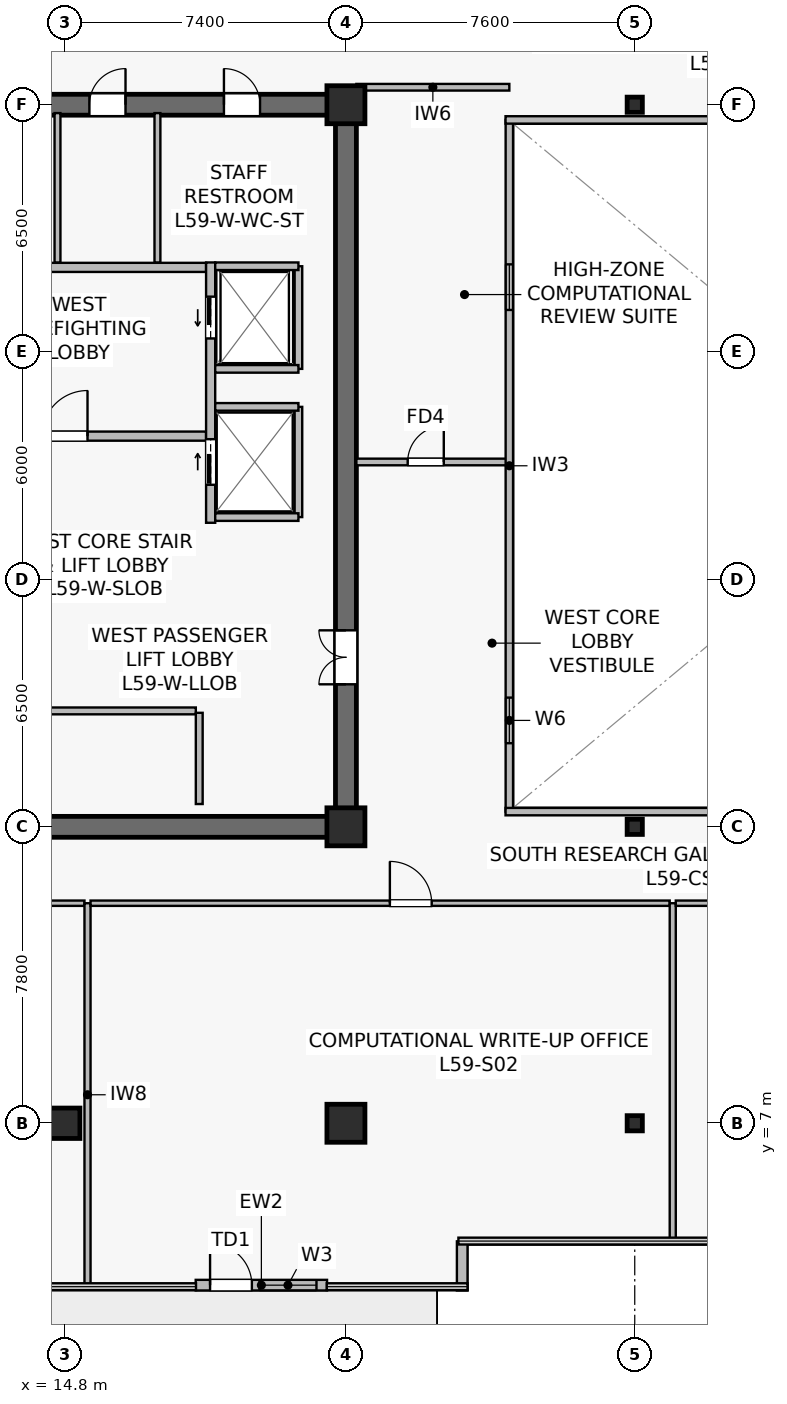
"""IFC4 building model, lengths in metres.
Left out: names, types, materials, properties, quantities, classifications, styles, units other than length and angle.
Written with IfcOpenShell. Run it as: python <this file> out.ifc"""

import sys

from ifc_helpers import new_model, si_unit, direction, frame, frame_2d, origin, origin_2d, place, context, subcontext, project, spatial, rectangle, hollow_rectangle, extrude, source, transform, mapped, element, fill, save


model = new_model("IFC4")
c1 = context("Model", 3, precision=1e-05, world=origin(), true_north=direction((0.0, 1.0)))
c2 = subcontext(c1, "Body", "Model", "MODEL_VIEW")
j1 = project(units=[si_unit("LENGTHUNIT", "METRE"), si_unit("PLANEANGLEUNIT", "RADIAN")], contexts=[c1])
p1 = place(None, origin())
s1 = spatial("IfcSite", under=j1, at=p1, CompositionType="ELEMENT")
p2 = place(p1, origin())
s2 = spatial("IfcBuilding", under=s1, at=p2, CompositionType="ELEMENT")
p3 = place(p2, frame((0.0, 0.0, 246.5)))
s3 = spatial("IfcBuildingStorey", under=s2, at=p3, CompositionType="ELEMENT", Elevation=246.5)
p4 = place(p3, frame((7.125, 14.8, 0.0), z_axis=(0.0, 0.0, 1.0), x_axis=(1.0, 0.0, 0.0)))
e1 = element("IfcWall", 1, at=p4, inside=s3, PredefinedType="SHEAR", context=c2, shape_type="SweptSolid", body=[
    extrude(rectangle(XDim=15.35, YDim=0.55, at=frame_2d((7.675, 0.0))), origin(), (0.0, 0.0, 1.0), 3.8),
])
p5 = place(p3, frame((7.125, 33.8, 0.0), z_axis=(0.0, 0.0, 1.0), x_axis=(1.0, 0.0, 0.0)))
e2 = element("IfcWall", 2, at=p5, inside=s3, PredefinedType="SHEAR", context=c2, shape_type="SweptSolid", body=[
    extrude(rectangle(XDim=15.35, YDim=0.55, at=frame_2d((7.675, 0.0))), origin(), (0.0, 0.0, 1.0), 3.8),
])
p6 = place(p5, frame((8.325, 0.0, 0.0)))
e3 = element("IfcOpeningElement", 3, at=p6, cuts=e2, PredefinedType="OPENING", context=c2, shape_type="SweptSolid", body=[
    extrude(rectangle(XDim=0.95, YDim=2.15, at=frame_2d((0.475, 1.075))), frame((0.0, 0.285, 0.0), z_axis=(0.0, -1.0, 0.0), x_axis=(1.0, 0.0, 0.0)), (0.0, 0.0, 1.0), 0.57),
])
p7 = place(p5, frame((11.865, 0.0, 0.0)))
e4 = element("IfcOpeningElement", 4, at=p7, cuts=e2, PredefinedType="OPENING", context=c2, shape_type="SweptSolid", body=[
    extrude(rectangle(XDim=0.95, YDim=2.15, at=frame_2d((0.475, 1.075))), frame((0.0, 0.285, 0.0), z_axis=(0.0, -1.0, 0.0), x_axis=(1.0, 0.0, 0.0)), (0.0, 0.0, 1.0), 0.57),
])
p8 = place(p3, frame((22.2, 15.075, 0.0), z_axis=(0.0, 0.0, 1.0), x_axis=(0.0, 1.0, 0.0)))
e5 = element("IfcWall", 5, at=p8, inside=s3, PredefinedType="SHEAR", context=c2, shape_type="SweptSolid", body=[
    extrude(rectangle(XDim=18.45, YDim=0.55, at=frame_2d((9.225, 0.0))), origin(), (0.0, 0.0, 1.0), 3.8),
])
p9 = place(p8, frame((3.475, 0.0, 0.0)))
e6 = element("IfcOpeningElement", 6, at=p9, cuts=e5, PredefinedType="OPENING", context=c2, shape_type="SweptSolid", body=[
    extrude(rectangle(XDim=1.42, YDim=2.2, at=frame_2d((0.71, 1.1))), frame((0.0, 0.285, 0.0), z_axis=(0.0, -1.0, 0.0), x_axis=(1.0, 0.0, 0.0)), (0.0, 0.0, 1.0), 0.57),
])
m1 = source(origin(), c2, "Body", "SweptSolid", [
    extrude(rectangle(XDim=0.8, YDim=0.8, at=origin_2d()), origin(), (0.0, 0.0, 1.0), 4.1),
])
p10 = place(p3, frame((14.8, 7.0, 0.0), z_axis=(0.0, 0.0, 1.0), x_axis=(1.0, 0.0, 0.0)))
e7 = element("IfcColumn", 7, at=p10, inside=s3, PredefinedType="COLUMN", context=c2, shape_type="MappedRepresentation", body=[
    mapped(m1, transform((0.0, 0.0, 0.0), scale=1.0)),
])
m2 = source(origin(), c2, "Body", "SweptSolid", [
    extrude(rectangle(XDim=1.0, YDim=1.0, at=origin_2d()), origin(), (0.0, 0.0, 1.0), 4.1),
])
for number, where, z_axis, x_axis in (
    (8, (22.2, 7.0, 0.0), (0.0, 0.0, 1.0), (1.0, 0.0, 0.0)),
    (9, (22.2, 14.8, 0.0), (0.0, 0.0, 1.0), (1.0, 0.0, 0.0)),
    (10, (22.2, 33.8, 0.0), (0.0, 0.0, 1.0), (1.0, 0.0, 0.0)),
):
    element("IfcColumn", number, at=place(p3, frame(where, z_axis=z_axis, x_axis=x_axis)), inside=s3, PredefinedType="COLUMN", context=c2, shape_type="MappedRepresentation", body=[
        mapped(m2, transform((0.0, 0.0, 0.0), scale=1.0)),
    ])
m3 = source(origin(), c2, "Body", "SweptSolid", [
    extrude(hollow_rectangle(XDim=0.4, YDim=0.4, WallThickness=0.019, at=origin_2d()), origin(), (0.0, 0.0, 1.0), 4.1),
])
for number, where, z_axis, x_axis in (
    (11, (29.8, 7.0, 0.0), (0.0, 0.0, 1.0), (1.0, 0.0, 0.0)),
    (12, (29.8, 14.8, 0.0), (0.0, 0.0, 1.0), (1.0, 0.0, 0.0)),
    (13, (29.8, 33.8, 0.0), (0.0, 0.0, 1.0), (1.0, 0.0, 0.0)),
):
    element("IfcColumn", number, at=place(p3, frame(where, z_axis=z_axis, x_axis=x_axis)), inside=s3, PredefinedType="COLUMN", context=c2, shape_type="MappedRepresentation", body=[
        mapped(m3, transform((0.0, 0.0, 0.0), scale=1.0)),
    ])
p11 = place(p3, frame((18.247, 2.74, 0.0), z_axis=(0.0, 0.0, 1.0), x_axis=(1.0, 0.0, 0.0)))
e14 = element("IfcWall", 14, at=p11, inside=s3, PredefinedType="STANDARD", context=c2, shape_type="SweptSolid", body=[
    extrude(rectangle(XDim=3.456, YDim=0.28, at=frame_2d((1.728, 0.0))), origin(), (0.0, 0.0, 1.0), 3.8),
])
p12 = place(p11, frame((0.378, 0.0, 0.0)))
e15 = element("IfcOpeningElement", 15, at=p12, cuts=e14, PredefinedType="OPENING", context=c2, shape_type="SweptSolid", body=[
    extrude(rectangle(XDim=1.1, YDim=2.2, at=frame_2d((0.55, 1.1))), frame((0.0, 0.15, 0.0), z_axis=(0.0, -1.0, 0.0), x_axis=(1.0, 0.0, 0.0)), (0.0, 0.0, 1.0), 0.3),
])
p13 = place(p11, frame((1.678, 0.0, 0.9)))
e16 = element("IfcOpeningElement", 16, at=p13, cuts=e14, PredefinedType="OPENING", context=c2, shape_type="SweptSolid", body=[
    extrude(rectangle(XDim=1.5, YDim=2.2, at=frame_2d((0.75, 1.1))), frame((0.0, 0.15, 0.0), z_axis=(0.0, -1.0, 0.0), x_axis=(1.0, 0.0, 0.0)), (0.0, 0.0, 1.0), 0.3),
])
p14 = place(p3, frame((25.26, 2.6, 0.0), z_axis=(0.0, 0.0, 1.0), x_axis=(0.0, 1.0, 0.0)))
e17 = element("IfcWall", 17, at=p14, inside=s3, PredefinedType="STANDARD", context=c2, shape_type="SweptSolid", body=[
    extrude(rectangle(XDim=1.293, YDim=0.28, at=frame_2d((0.646, 0.0))), origin(), (0.0, 0.0, 1.0), 3.8),
])
p15 = place(p3, frame((11.6, 25.08, 0.0), z_axis=(0.0, 0.0, 1.0), x_axis=(1.0, 0.0, 0.0)))
e18 = element("IfcWall", 18, at=p15, inside=s3, PredefinedType="SOLIDWALL", context=c2, shape_type="SweptSolid", body=[
    extrude(rectangle(XDim=6.92, YDim=0.24, at=frame_2d((3.46, 0.0))), origin(), (0.0, 0.0, 1.0), 3.197),
])
p16 = place(p15, frame((2.6, 0.0, 0.0)))
e19 = element("IfcOpeningElement", 19, at=p16, cuts=e18, PredefinedType="OPENING", context=c2, shape_type="SweptSolid", body=[
    extrude(rectangle(XDim=1.2, YDim=2.16, at=frame_2d((0.6, 1.08))), frame((0.0, 0.13, 0.0), z_axis=(0.0, -1.0, 0.0), x_axis=(1.0, 0.0, 0.0)), (0.0, 0.0, 1.0), 0.26),
])
p17 = place(p3, frame((11.6, 29.52, 0.0), z_axis=(0.0, 0.0, 1.0), x_axis=(1.0, 0.0, 0.0)))
e20 = element("IfcWall", 20, at=p17, inside=s3, PredefinedType="SOLIDWALL", context=c2, shape_type="SweptSolid", body=[
    extrude(rectangle(XDim=6.92, YDim=0.24, at=frame_2d((3.46, 0.0))), origin(), (0.0, 0.0, 1.0), 3.197),
])
p18 = place(p3, frame((18.64, 22.8, 0.0), z_axis=(0.0, 0.0, 1.0), x_axis=(0.0, 1.0, 0.0)))
e21 = element("IfcWall", 21, at=p18, inside=s3, PredefinedType="SOLIDWALL", context=c2, shape_type="SweptSolid", body=[
    extrude(rectangle(XDim=6.85, YDim=0.24, at=frame_2d((3.425, 0.0))), origin(), (0.0, 0.0, 1.0), 2.935),
])
p19 = place(p18, frame((4.85, 0.0, 0.0)))
e22 = element("IfcOpeningElement", 22, at=p19, cuts=e21, PredefinedType="OPENING", context=c2, shape_type="SweptSolid", body=[
    extrude(rectangle(XDim=1.1, YDim=2.22, at=frame_2d((0.55, 1.11))), frame((0.0, 0.13, 0.0), z_axis=(0.0, -1.0, 0.0), x_axis=(1.0, 0.0, 0.0)), (0.0, 0.0, 1.0), 0.26),
])
p20 = place(p18, frame((1.0, 0.0, 0.0)))
e23 = element("IfcOpeningElement", 23, at=p20, cuts=e21, PredefinedType="OPENING", context=c2, shape_type="SweptSolid", body=[
    extrude(rectangle(XDim=1.2, YDim=2.22, at=frame_2d((0.6, 1.11))), frame((0.0, 0.13, 0.0), z_axis=(0.0, -1.0, 0.0), x_axis=(1.0, 0.0, 0.0)), (0.0, 0.0, 1.0), 0.26),
])
p21 = place(p3, frame((20.95, 26.85, 0.0), z_axis=(0.0, 0.0, 1.0), x_axis=(0.0, 1.0, 0.0)))
e24 = element("IfcWall", 24, at=p21, inside=s3, PredefinedType="SOLIDWALL", context=c2, shape_type="SweptSolid", body=[
    extrude(rectangle(XDim=2.7, YDim=0.2, at=frame_2d((1.35, 0.0))), origin(), (0.0, 0.0, 1.0), 3.8),
])
p22 = place(p3, frame((18.76, 29.55, 0.0), z_axis=(0.0, 0.0, 1.0), x_axis=(1.0, 0.0, 0.0)))
e25 = element("IfcWall", 25, at=p22, inside=s3, PredefinedType="SOLIDWALL", context=c2, shape_type="SweptSolid", body=[
    extrude(rectangle(XDim=2.19, YDim=0.2, at=frame_2d((1.095, 0.0))), origin(), (0.0, 0.0, 1.0), 3.8),
])
p23 = place(p3, frame((18.76, 26.85, 0.0), z_axis=(0.0, 0.0, 1.0), x_axis=(1.0, 0.0, 0.0)))
e26 = element("IfcWall", 26, at=p23, inside=s3, PredefinedType="SOLIDWALL", context=c2, shape_type="SweptSolid", body=[
    extrude(rectangle(XDim=2.19, YDim=0.2, at=frame_2d((1.095, 0.0))), origin(), (0.0, 0.0, 1.0), 3.197),
])
p24 = place(p3, frame((20.95, 22.95, 0.0), z_axis=(0.0, 0.0, 1.0), x_axis=(0.0, 1.0, 0.0)))
e27 = element("IfcWall", 27, at=p24, inside=s3, PredefinedType="SOLIDWALL", context=c2, shape_type="SweptSolid", body=[
    extrude(rectangle(XDim=2.9, YDim=0.2, at=frame_2d((1.45, 0.0))), origin(), (0.0, 0.0, 1.0), 2.935),
])
for number, where, z_axis, x_axis in (
    (28, (18.76, 25.85, 0.0), (0.0, 0.0, 1.0), (1.0, 0.0, 0.0)),
    (29, (18.76, 22.95, 0.0), (0.0, 0.0, 1.0), (1.0, 0.0, 0.0)),
):
    element("IfcWall", number, at=place(p3, frame(where, z_axis=z_axis, x_axis=x_axis)), inside=s3, PredefinedType="SOLIDWALL", context=c2, shape_type="SweptSolid", body=[
        extrude(rectangle(XDim=2.19, YDim=0.2, at=frame_2d((1.095, 0.0))), origin(), (0.0, 0.0, 1.0), 3.8),
    ])
p25 = place(p3, frame((8.85, 17.85, 0.0), z_axis=(0.0, 0.0, 1.0), x_axis=(1.0, 0.0, 0.0)))
e30 = element("IfcWall", 30, at=p25, inside=s3, PredefinedType="SOLIDWALL", context=c2, shape_type="SweptSolid", body=[
    extrude(rectangle(XDim=9.4, YDim=0.18, at=frame_2d((4.7, 0.0))), origin(), (0.0, 0.0, 1.0), 3.197),
])
p26 = place(p25, frame((4.225, 0.0, 0.0)))
e31 = element("IfcOpeningElement", 31, at=p26, cuts=e30, PredefinedType="OPENING", context=c2, shape_type="SweptSolid", body=[
    extrude(rectangle(XDim=0.95, YDim=2.15, at=frame_2d((0.475, 1.075))), frame((0.0, 0.1, 0.0), z_axis=(0.0, -1.0, 0.0), x_axis=(1.0, 0.0, 0.0)), (0.0, 0.0, 1.0), 0.2),
])
p27 = place(p3, frame((18.34, 15.4, 0.0), z_axis=(0.0, 0.0, 1.0), x_axis=(0.0, 1.0, 0.0)))
e32 = element("IfcWall", 32, at=p27, inside=s3, PredefinedType="SOLIDWALL", context=c2, shape_type="SweptSolid", body=[
    extrude(rectangle(XDim=2.4, YDim=0.18, at=frame_2d((1.2, 0.0))), origin(), (0.0, 0.0, 1.0), 3.8),
])
p28 = place(p3, frame((14.61, 29.65, 0.0), z_axis=(0.0, 0.0, 1.0), x_axis=(0.0, 1.0, 0.0)))
e33 = element("IfcWall", 33, at=p28, inside=s3, PredefinedType="PLUMBINGWALL", context=c2, shape_type="SweptSolid", body=[
    extrude(rectangle(XDim=3.93, YDim=0.155, at=frame_2d((1.965, 0.0))), origin(), (0.0, 0.0, 1.0), 3.197),
])
p29 = place(p3, frame((17.24, 29.65, 0.0), z_axis=(0.0, 0.0, 1.0), x_axis=(0.0, 1.0, 0.0)))
e34 = element("IfcWall", 34, at=p29, inside=s3, PredefinedType="PLUMBINGWALL", context=c2, shape_type="SweptSolid", body=[
    extrude(rectangle(XDim=3.93, YDim=0.155, at=frame_2d((1.965, 0.0))), origin(), (0.0, 0.0, 1.0), 3.8),
])
p30 = place(p3, frame((22.475, 34.26, 0.0), z_axis=(0.0, 0.0, 1.0), x_axis=(1.0, 0.0, 0.0)))
e35 = element("IfcWall", 35, at=p30, inside=s3, PredefinedType="PARTITIONING", context=c2, shape_type="SweptSolid", body=[
    extrude(rectangle(XDim=4.025, YDim=0.175, at=frame_2d((2.012, 0.0))), origin(), (0.0, 0.0, 1.0), 3.535),
])
p31 = place(p3, frame((22.475, 24.4, 0.0), z_axis=(0.0, 0.0, 1.0), x_axis=(1.0, 0.0, 0.0)))
e36 = element("IfcWall", 36, at=p31, inside=s3, PredefinedType="PARTITIONING", context=c2, shape_type="SweptSolid", body=[
    extrude(rectangle(XDim=4.025, YDim=0.175, at=frame_2d((2.012, 0.0))), origin(), (0.0, 0.0, 1.0), 3.8),
])
p32 = place(p31, frame((1.35, 0.0, 0.0)))
e37 = element("IfcOpeningElement", 37, at=p32, cuts=e36, PredefinedType="OPENING", context=c2, shape_type="SweptSolid", body=[
    extrude(rectangle(XDim=0.95, YDim=2.15, at=frame_2d((0.475, 1.075))), frame((0.0, 0.098, 0.0), z_axis=(0.0, -1.0, 0.0), x_axis=(1.0, 0.0, 0.0)), (0.0, 0.0, 1.0), 0.195),
])
p33 = place(p3, frame((26.5, 15.2, 0.0), z_axis=(0.0, 0.0, 1.0), x_axis=(0.0, 1.0, 0.0)))
e38 = element("IfcWall", 38, at=p33, inside=s3, PredefinedType="SOLIDWALL", context=c2, shape_type="SweptSolid", body=[
    extrude(rectangle(XDim=18.2, YDim=0.195, at=frame_2d((9.1, 0.0))), origin(), (0.0, 0.0, 1.0), 3.8),
])
p34 = place(p33, frame((1.8, 0.0, 0.9)))
e39 = element("IfcOpeningElement", 39, at=p34, cuts=e38, PredefinedType="OPENING", context=c2, shape_type="SweptSolid", body=[
    extrude(rectangle(XDim=1.2, YDim=1.35, at=frame_2d((0.6, 0.675))), frame((0.0, 0.107, 0.0), z_axis=(0.0, -1.0, 0.0), x_axis=(1.0, 0.0, 0.0)), (0.0, 0.0, 1.0), 0.215),
])
p35 = place(p33, frame((13.2, 0.0, 0.9)))
e40 = element("IfcOpeningElement", 40, at=p35, cuts=e38, PredefinedType="OPENING", context=c2, shape_type="SweptSolid", body=[
    extrude(rectangle(XDim=1.2, YDim=1.35, at=frame_2d((0.6, 0.675))), frame((0.0, 0.107, 0.0), z_axis=(0.0, -1.0, 0.0), x_axis=(1.0, 0.0, 0.0)), (0.0, 0.0, 1.0), 0.215),
])
for number, where, z_axis, x_axis in (
    (41, (26.4, 15.2, 0.0), (0.0, 0.0, 1.0), (1.0, 0.0, 0.0)),
    (42, (26.4, 33.4, 0.0), (0.0, 0.0, 1.0), (1.0, 0.0, 0.0)),
):
    element("IfcWall", number, at=place(p3, frame(where, z_axis=z_axis, x_axis=x_axis)), inside=s3, PredefinedType="SOLIDWALL", context=c2, shape_type="SweptSolid", body=[
        extrude(rectangle(XDim=22.0, YDim=0.195, at=frame_2d((11.0, 0.0))), origin(), (0.0, 0.0, 1.0), 3.8),
    ])
p36 = place(p3, frame((7.31, 12.79, 0.0), z_axis=(0.0, 0.0, 1.0), x_axis=(1.0, 0.0, 0.0)))
e43 = element("IfcWall", 43, at=p36, inside=s3, PredefinedType="PARTITIONING", context=c2, shape_type="SweptSolid", body=[
    extrude(rectangle(XDim=8.01, YDim=0.14, at=frame_2d((4.005, 0.0))), origin(), (0.0, 0.0, 1.0), 3.197),
])
p37 = place(p36, frame((3.083, 0.0, 0.0)))
e44 = element("IfcOpeningElement", 44, at=p37, cuts=e43, PredefinedType="OPENING", context=c2, shape_type="SweptSolid", body=[
    extrude(rectangle(XDim=1.1, YDim=2.18, at=frame_2d((0.55, 1.09))), frame((0.0, 0.08, 0.0), z_axis=(0.0, -1.0, 0.0), x_axis=(1.0, 0.0, 0.0)), (0.0, 0.0, 1.0), 0.16),
])
p38 = place(p3, frame((15.4, 2.71, 0.0), z_axis=(0.0, 0.0, 1.0), x_axis=(0.0, 1.0, 0.0)))
e45 = element("IfcWall", 45, at=p38, inside=s3, PredefinedType="PARTITIONING", context=c2, shape_type="SweptSolid", body=[
    extrude(rectangle(XDim=10.08, YDim=0.16, at=frame_2d((5.04, 0.0))), origin(), (0.0, 0.0, 1.0), 3.135),
])
p39 = place(p3, frame((15.48, 12.79, 0.0), z_axis=(0.0, 0.0, 1.0), x_axis=(1.0, 0.0, 0.0)))
e46 = element("IfcWall", 46, at=p39, inside=s3, PredefinedType="PARTITIONING", context=c2, shape_type="SweptSolid", body=[
    extrude(rectangle(XDim=15.24, YDim=0.14, at=frame_2d((7.62, 0.0))), origin(), (0.0, 0.0, 1.0), 3.197),
])
p40 = place(p39, frame((7.876, 0.0, 0.0)))
e47 = element("IfcOpeningElement", 47, at=p40, cuts=e46, PredefinedType="OPENING", context=c2, shape_type="SweptSolid", body=[
    extrude(rectangle(XDim=1.1, YDim=2.18, at=frame_2d((0.55, 1.09))), frame((0.0, 0.08, 0.0), z_axis=(0.0, -1.0, 0.0), x_axis=(1.0, 0.0, 0.0)), (0.0, 0.0, 1.0), 0.16),
])
p41 = place(p3, frame((30.8, 3.91, 0.0), z_axis=(0.0, 0.0, 1.0), x_axis=(0.0, 1.0, 0.0)))
e48 = element("IfcWall", 48, at=p41, inside=s3, PredefinedType="PARTITIONING", context=c2, shape_type="SweptSolid", body=[
    extrude(rectangle(XDim=8.88, YDim=0.16, at=frame_2d((4.44, 0.0))), origin(), (0.0, 0.0, 1.0), 3.135),
])
p42 = place(p3, frame((30.88, 12.79, 0.0), z_axis=(0.0, 0.0, 1.0), x_axis=(1.0, 0.0, 0.0)))
e49 = element("IfcWall", 49, at=p42, inside=s3, PredefinedType="PARTITIONING", context=c2, shape_type="SweptSolid", body=[
    extrude(rectangle(XDim=17.24, YDim=0.14, at=frame_2d((8.62, 0.0))), origin(), (0.0, 0.0, 1.0), 3.197),
])
p43 = place(p42, frame((7.144, 0.0, 0.0)))
e50 = element("IfcOpeningElement", 50, at=p43, cuts=e49, PredefinedType="OPENING", context=c2, shape_type="SweptSolid", body=[
    extrude(rectangle(XDim=1.1, YDim=2.18, at=frame_2d((0.55, 1.09))), frame((0.0, 0.08, 0.0), z_axis=(0.0, -1.0, 0.0), x_axis=(1.0, 0.0, 0.0)), (0.0, 0.0, 1.0), 0.16),
])
m4 = source(origin(), c2, "Body", "SweptSolid", [
    extrude(rectangle(XDim=1.1, YDim=2.2, at=frame_2d((0.55, 1.1))), frame((0.0, 0.025, 0.0), z_axis=(0.0, -1.0, 0.0), x_axis=(1.0, 0.0, 0.0)), (0.0, 0.0, 1.0), 0.05),
])
p44 = place(p12, origin())
e51 = element("IfcDoor", 51, at=p44, inside=s3, OperationType="SINGLE_SWING_LEFT", PredefinedType="DOOR", context=c2, shape_type="MappedRepresentation", body=[
    mapped(m4, transform((0.0, 0.0, 0.0), scale=1.0)),
])
fill(e15, e51)
m5 = source(origin(), c2, "Body", "SweptSolid", [
    extrude(rectangle(XDim=1.5, YDim=2.2, at=frame_2d((0.75, 1.1))), frame((0.0, 0.03, 0.0), z_axis=(0.0, -1.0, 0.0), x_axis=(1.0, 0.0, 0.0)), (0.0, 0.0, 1.0), 0.06),
])
p45 = place(p13, origin())
e52 = element("IfcWindow", 52, at=p45, inside=s3, PartitioningType="SINGLE_PANEL", PredefinedType="WINDOW", context=c2, shape_type="MappedRepresentation", body=[
    mapped(m5, transform((0.0, 0.0, 0.0), scale=1.0)),
])
fill(e16, e52)
m6 = source(origin(), c2, "Body", "SweptSolid", [
    extrude(rectangle(XDim=1.2, YDim=1.35, at=frame_2d((0.6, 0.675))), frame((0.0, 0.03, 0.0), z_axis=(0.0, -1.0, 0.0), x_axis=(1.0, 0.0, 0.0)), (0.0, 0.0, 1.0), 0.06),
])
p46 = place(p34, origin())
e53 = element("IfcWindow", 53, at=p46, inside=s3, PartitioningType="SINGLE_PANEL", PredefinedType="WINDOW", context=c2, shape_type="MappedRepresentation", body=[
    mapped(m6, transform((0.0, 0.0, 0.0), scale=1.0)),
])
fill(e39, e53)
p47 = place(p35, origin())
e54 = element("IfcWindow", 54, at=p47, inside=s3, PartitioningType="SINGLE_PANEL", PredefinedType="WINDOW", context=c2, shape_type="MappedRepresentation", body=[
    mapped(m6, transform((0.0, 0.0, 0.0), scale=1.0)),
])
fill(e40, e54)
m7 = source(origin(), c2, "Body", "SweptSolid", [
    extrude(rectangle(XDim=1.2, YDim=2.16, at=frame_2d((0.6, 1.08))), frame((0.0, 0.025, 0.0), z_axis=(0.0, -1.0, 0.0), x_axis=(1.0, 0.0, 0.0)), (0.0, 0.0, 1.0), 0.05),
])
p48 = place(p16, origin())
e55 = element("IfcDoor", 55, at=p48, inside=s3, OperationType="SINGLE_SWING_RIGHT", PredefinedType="DOOR", context=c2, shape_type="MappedRepresentation", body=[
    mapped(m7, transform((0.0, 0.0, 0.0), scale=1.0)),
])
fill(e19, e55)
m8 = source(origin(), c2, "Body", "SweptSolid", [
    extrude(rectangle(XDim=1.1, YDim=2.22, at=frame_2d((0.55, 1.11))), frame((0.0, 0.025, 0.0), z_axis=(0.0, -1.0, 0.0), x_axis=(1.0, 0.0, 0.0)), (0.0, 0.0, 1.0), 0.05),
])
p49 = place(p19, origin())
e56 = element("IfcDoor", 56, at=p49, inside=s3, OperationType="SLIDING_TO_LEFT", PredefinedType="USERDEFINED", context=c2, shape_type="MappedRepresentation", body=[
    mapped(m8, transform((0.0, 0.0, 0.0), scale=1.0)),
])
fill(e22, e56)
m9 = source(origin(), c2, "Body", "SweptSolid", [
    extrude(rectangle(XDim=1.2, YDim=2.22, at=frame_2d((0.6, 1.11))), frame((0.0, 0.025, 0.0), z_axis=(0.0, -1.0, 0.0), x_axis=(1.0, 0.0, 0.0)), (0.0, 0.0, 1.0), 0.05),
])
p50 = place(p20, origin())
e57 = element("IfcDoor", 57, at=p50, inside=s3, OperationType="SLIDING_TO_RIGHT", PredefinedType="USERDEFINED", context=c2, shape_type="MappedRepresentation", body=[
    mapped(m9, transform((0.0, 0.0, 0.0), scale=1.0)),
])
fill(e23, e57)
m10 = source(origin(), c2, "Body", "SweptSolid", [
    extrude(rectangle(XDim=1.42, YDim=2.2, at=frame_2d((0.71, 1.1))), frame((0.0, 0.025, 0.0), z_axis=(0.0, -1.0, 0.0), x_axis=(1.0, 0.0, 0.0)), (0.0, 0.0, 1.0), 0.05),
])
p51 = place(p9, origin())
e58 = element("IfcDoor", 58, at=p51, inside=s3, OperationType="DOUBLE_DOOR_SINGLE_SWING", PredefinedType="DOOR", context=c2, shape_type="MappedRepresentation", body=[
    mapped(m10, transform((0.0, 0.0, 0.0), scale=1.0)),
])
fill(e6, e58)
m11 = source(origin(), c2, "Body", "SweptSolid", [
    extrude(rectangle(XDim=0.95, YDim=2.15, at=frame_2d((0.475, 1.075))), frame((0.0, 0.025, 0.0), z_axis=(0.0, -1.0, 0.0), x_axis=(1.0, 0.0, 0.0)), (0.0, 0.0, 1.0), 0.05),
])
p52 = place(p6, origin())
e59 = element("IfcDoor", 59, at=p52, inside=s3, OperationType="SINGLE_SWING_RIGHT", PredefinedType="DOOR", context=c2, shape_type="MappedRepresentation", body=[
    mapped(m11, transform((0.0, 0.0, 0.0), scale=1.0)),
])
fill(e3, e59)
p53 = place(p7, origin())
e60 = element("IfcDoor", 60, at=p53, inside=s3, OperationType="SINGLE_SWING_LEFT", PredefinedType="DOOR", context=c2, shape_type="MappedRepresentation", body=[
    mapped(m11, transform((0.0, 0.0, 0.0), scale=1.0)),
])
fill(e4, e60)
p54 = place(p32, origin())
e61 = element("IfcDoor", 61, at=p54, inside=s3, OperationType="SINGLE_SWING_RIGHT", PredefinedType="DOOR", context=c2, shape_type="MappedRepresentation", body=[
    mapped(m11, transform((0.0, 0.0, 0.0), scale=1.0)),
])
fill(e37, e61)
m12 = source(origin(), c2, "Body", "SweptSolid", [
    extrude(rectangle(XDim=1.1, YDim=2.18, at=frame_2d((0.55, 1.09))), frame((0.0, 0.025, 0.0), z_axis=(0.0, -1.0, 0.0), x_axis=(1.0, 0.0, 0.0)), (0.0, 0.0, 1.0), 0.05),
])
p55 = place(p40, origin())
e62 = element("IfcDoor", 62, at=p55, inside=s3, OperationType="SINGLE_SWING_LEFT", PredefinedType="DOOR", context=c2, shape_type="MappedRepresentation", body=[
    mapped(m12, transform((0.0, 0.0, 0.0), scale=1.0)),
])
fill(e47, e62)
save(model, sys.argv[1])
